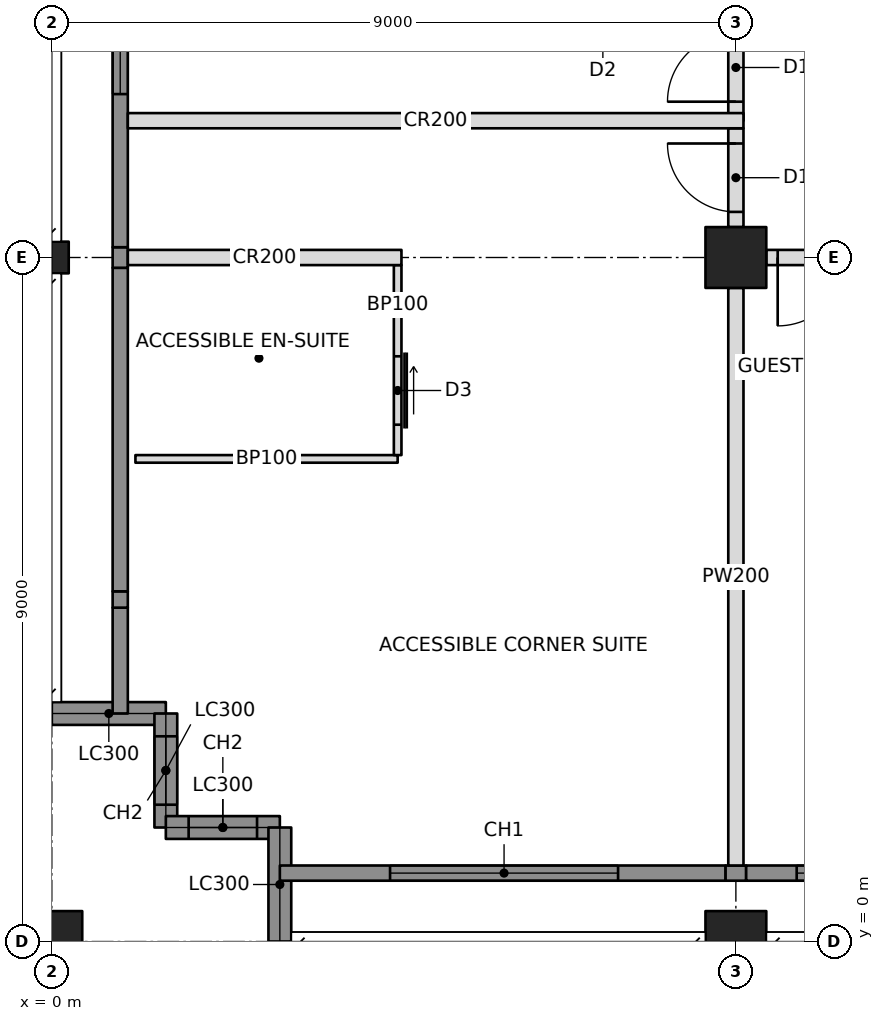
"""IFC4 building model, lengths in metres.
Left out: names, types, materials, properties, quantities, classifications, styles, units other than length and angle.
Written with IfcOpenShell. Run it as: python <this file> out.ifc"""

import sys

from ifc_helpers import new_model, si_unit, direction, frame, frame_2d, origin, origin_with_axes, origin_2d, place, context, subcontext, project, spatial, rectangle, hollow_rectangle, i_section, extrude, element, fill, save


model = new_model("IFC4")
c1 = context("Model", 3, precision=1e-05, world=origin(), true_north=direction((0.0, 1.0)))
c2 = subcontext(c1, "Body", "Model", "MODEL_VIEW")
j1 = project(units=[si_unit("LENGTHUNIT", "METRE"), si_unit("PLANEANGLEUNIT", "RADIAN")], contexts=[c1])
p1 = place(None, origin())
s1 = spatial("IfcSite", under=j1, at=p1, CompositionType="ELEMENT")
p2 = place(p1, origin())
s2 = spatial("IfcBuilding", under=s1, at=p2, CompositionType="ELEMENT")
p3 = place(p2, frame((0.0, 0.0, 248.2)))
s3 = spatial("IfcBuildingStorey", under=s2, at=p3, CompositionType="ELEMENT", Elevation=248.2)
p4 = place(p3, origin_with_axes())
e1 = element("IfcColumn", 1, at=p4, inside=s3, PredefinedType="COLUMN", context=c2, shape_type="SweptSolid", body=[
    extrude(hollow_rectangle(XDim=0.8, YDim=0.8, WallThickness=0.032, at=origin_2d()), origin(), (0.0, 0.0, 1.0), 3.6),
])
p5 = place(p3, frame((0.0, 9.0, 0.0), z_axis=(0.0, 0.0, 1.0), x_axis=(0.0, 1.0, 0.0)))
e2 = element("IfcColumn", 2, at=p5, inside=s3, PredefinedType="COLUMN", context=c2, shape_type="SweptSolid", body=[
    extrude(i_section(OverallWidth=0.417, OverallDepth=0.445, WebThickness=0.039, FlangeThickness=0.063, at=origin_2d()), origin(), (0.0, 0.0, 1.0), 3.6),
])
for number, where, z_axis, x_axis in (
    (3, (9.0, 0.0, 0.0), (0.0, 0.0, 1.0), (1.0, 0.0, 0.0)),
    (4, (9.0, 9.0, 0.0), (0.0, 0.0, 1.0), (1.0, 0.0, 0.0)),
):
    element("IfcColumn", number, at=place(p3, frame(where, z_axis=z_axis, x_axis=x_axis)), inside=s3, PredefinedType="COLUMN", context=c2, shape_type="SweptSolid", body=[
        extrude(hollow_rectangle(XDim=0.8, YDim=0.8, WallThickness=0.032, at=origin_2d()), origin(), (0.0, 0.0, 1.0), 3.6),
    ])
p6 = place(p3, frame((0.0, 3.0, 0.0), z_axis=(0.0, 0.0, 1.0), x_axis=(1.0, 0.0, 0.0)))
e5 = element("IfcWall", 5, at=p6, inside=s3, PredefinedType="SOLIDWALL", context=c2, shape_type="SweptSolid", body=[
    extrude(rectangle(XDim=1.5, YDim=0.3, at=frame_2d((0.75, 0.0))), origin(), (0.0, 0.0, 1.0), 2.62),
])
p7 = place(p3, frame((1.5, 3.0, 0.0), z_axis=(0.0, 0.0, 1.0), x_axis=(0.0, -1.0, 0.0)))
e6 = element("IfcWall", 6, at=p7, inside=s3, PredefinedType="SOLIDWALL", context=c2, shape_type="SweptSolid", body=[
    extrude(rectangle(XDim=1.5, YDim=0.3, at=frame_2d((0.75, 0.0))), origin(), (0.0, 0.0, 1.0), 3.4),
])
p8 = place(p7, frame((0.3, 0.0, 0.6)))
e7 = element("IfcOpeningElement", 7, at=p8, cuts=e6, PredefinedType="OPENING", context=c2, shape_type="SweptSolid", body=[
    extrude(rectangle(XDim=0.9, YDim=2.2, at=frame_2d((0.45, 1.1))), frame((0.0, 0.16, 0.0), z_axis=(0.0, -1.0, 0.0), x_axis=(1.0, 0.0, 0.0)), (0.0, 0.0, 1.0), 0.32),
])
p9 = place(p3, frame((1.5, 1.5, 0.0), z_axis=(0.0, 0.0, 1.0), x_axis=(1.0, 0.0, 0.0)))
e8 = element("IfcWall", 8, at=p9, inside=s3, PredefinedType="SOLIDWALL", context=c2, shape_type="SweptSolid", body=[
    extrude(rectangle(XDim=1.5, YDim=0.3, at=frame_2d((0.75, 0.0))), origin(), (0.0, 0.0, 1.0), 3.4),
])
p10 = place(p9, frame((0.3, 0.0, 0.6)))
e9 = element("IfcOpeningElement", 9, at=p10, cuts=e8, PredefinedType="OPENING", context=c2, shape_type="SweptSolid", body=[
    extrude(rectangle(XDim=0.9, YDim=2.2, at=frame_2d((0.45, 1.1))), frame((0.0, 0.16, 0.0), z_axis=(0.0, -1.0, 0.0), x_axis=(1.0, 0.0, 0.0)), (0.0, 0.0, 1.0), 0.32),
])
p11 = place(p3, frame((3.0, 1.5, 0.0), z_axis=(0.0, 0.0, 1.0), x_axis=(0.0, -1.0, 0.0)))
e10 = element("IfcWall", 10, at=p11, inside=s3, PredefinedType="SOLIDWALL", context=c2, shape_type="SweptSolid", body=[
    extrude(rectangle(XDim=1.5, YDim=0.3, at=frame_2d((0.75, 0.0))), origin(), (0.0, 0.0, 1.0), 2.62),
])
p12 = place(p3, frame((3.0, 0.9, 0.0), z_axis=(0.0, 0.0, 1.0), x_axis=(1.0, 0.0, 0.0)))
e11 = element("IfcWall", 11, at=p12, inside=s3, PredefinedType="SOLIDWALL", context=c2, shape_type="SweptSolid", body=[
    extrude(rectangle(XDim=5.865, YDim=0.2, at=frame_2d((2.932, 0.0))), origin(), (0.0, 0.0, 1.0), 3.4),
])
p13 = place(p12, frame((1.45, 0.0, 0.6)))
e12 = element("IfcOpeningElement", 12, at=p13, cuts=e11, PredefinedType="OPENING", context=c2, shape_type="SweptSolid", body=[
    extrude(rectangle(XDim=3.0, YDim=2.2, at=frame_2d((1.5, 1.1))), frame((0.0, 0.11, 0.0), z_axis=(0.0, -1.0, 0.0), x_axis=(1.0, 0.0, 0.0)), (0.0, 0.0, 1.0), 0.22),
])
p14 = place(p3, frame((0.9, 3.0, 0.0), z_axis=(0.0, 0.0, 1.0), x_axis=(0.0, 1.0, 0.0)))
e13 = element("IfcWall", 13, at=p14, inside=s3, PredefinedType="SOLIDWALL", context=c2, shape_type="SweptSolid", body=[
    extrude(rectangle(XDim=1.393, YDim=0.2, at=frame_2d((0.696, 0.0))), origin(), (0.0, 0.0, 1.0), 3.4),
])
p15 = place(p3, frame((1.0, 9.0, 0.0), z_axis=(0.0, 0.0, 1.0), x_axis=(1.0, 0.0, 0.0)))
e14 = element("IfcWall", 14, at=p15, inside=s3, PredefinedType="PARTITIONING", context=c2, shape_type="SweptSolid", body=[
    extrude(rectangle(XDim=3.6, YDim=0.2, at=frame_2d((1.8, 0.0))), origin(), (0.0, 0.0, 1.0), 2.638),
])
p16 = place(p3, frame((9.4, 9.0, 0.0), z_axis=(0.0, 0.0, 1.0), x_axis=(1.0, 0.0, 0.0)))
e15 = element("IfcWall", 15, at=p16, inside=s3, PredefinedType="PARTITIONING", context=c2, shape_type="SweptSolid", body=[
    extrude(rectangle(XDim=8.2, YDim=0.2, at=frame_2d((4.1, 0.0))), origin(), (0.0, 0.0, 1.0), 2.605),
])
p17 = place(p16, frame((0.15, 0.0, 0.0)))
e16 = element("IfcOpeningElement", 16, at=p17, cuts=e15, PredefinedType="OPENING", context=c2, shape_type="SweptSolid", body=[
    extrude(rectangle(XDim=0.9, YDim=2.1, at=frame_2d((0.45, 1.05))), frame((0.0, 0.11, 0.0), z_axis=(0.0, -1.0, 0.0), x_axis=(1.0, 0.0, 0.0)), (0.0, 0.0, 1.0), 0.22),
])
p18 = place(p3, frame((9.0, 10.8, 0.0), z_axis=(0.0, 0.0, 1.0), x_axis=(0.0, 1.0, 0.0)))
e17 = element("IfcWall", 17, at=p18, inside=s3, PredefinedType="PARTITIONING", context=c2, shape_type="SweptSolid", body=[
    extrude(rectangle(XDim=6.8, YDim=0.2, at=frame_2d((3.4, 0.0))), origin(), (0.0, 0.0, 1.0), 2.605),
])
p19 = place(p18, frame((0.25, 0.0, 0.0)))
e18 = element("IfcOpeningElement", 18, at=p19, cuts=e17, PredefinedType="OPENING", context=c2, shape_type="SweptSolid", body=[
    extrude(rectangle(XDim=0.9, YDim=2.1, at=frame_2d((0.45, 1.05))), frame((0.0, 0.11, 0.0), z_axis=(0.0, -1.0, 0.0), x_axis=(1.0, 0.0, 0.0)), (0.0, 0.0, 1.0), 0.22),
])
p20 = place(p18, frame((3.85, 0.0, 0.0)))
e19 = element("IfcOpeningElement", 19, at=p20, cuts=e17, PredefinedType="OPENING", context=c2, shape_type="SweptSolid", body=[
    extrude(rectangle(XDim=0.9, YDim=2.1, at=frame_2d((0.45, 1.05))), frame((0.0, 0.11, 0.0), z_axis=(0.0, -1.0, 0.0), x_axis=(1.0, 0.0, 0.0)), (0.0, 0.0, 1.0), 0.22),
])
p21 = place(p3, frame((1.0, 10.8, 0.0), z_axis=(0.0, 0.0, 1.0), x_axis=(1.0, 0.0, 0.0)))
e20 = element("IfcWall", 20, at=p21, inside=s3, PredefinedType="PARTITIONING", context=c2, shape_type="SweptSolid", body=[
    extrude(rectangle(XDim=8.1, YDim=0.2, at=frame_2d((4.05, 0.0))), origin(), (0.0, 0.0, 1.0), 2.604),
])
p22 = place(p3, frame((9.0, 8.6, 0.0), z_axis=(0.0, 0.0, 1.0), x_axis=(0.0, -1.0, 0.0)))
e21 = element("IfcWall", 21, at=p22, inside=s3, PredefinedType="PARTITIONING", context=c2, shape_type="SweptSolid", body=[
    extrude(rectangle(XDim=7.6, YDim=0.2, at=frame_2d((3.8, 0.0))), origin(), (0.0, 0.0, 1.0), 2.638),
])
p23 = place(p3, frame((1.1, 6.35, 0.0), z_axis=(0.0, 0.0, 1.0), x_axis=(1.0, 0.0, 0.0)))
e22 = element("IfcWall", 22, at=p23, inside=s3, PredefinedType="PARTITIONING", context=c2, shape_type="SweptSolid", body=[
    extrude(rectangle(XDim=3.45, YDim=0.1, at=frame_2d((1.725, 0.0))), origin(), (0.0, 0.0, 1.0), 3.4),
])
p24 = place(p3, frame((4.55, 8.9, 0.0), z_axis=(0.0, 0.0, 1.0), x_axis=(0.0, -1.0, 0.0)))
e23 = element("IfcWall", 23, at=p24, inside=s3, PredefinedType="PARTITIONING", context=c2, shape_type="SweptSolid", body=[
    extrude(rectangle(XDim=2.5, YDim=0.1, at=frame_2d((1.25, 0.0))), origin(), (0.0, 0.0, 1.0), 2.638),
])
p25 = place(p24, frame((1.2, 0.0, 0.0)))
e24 = element("IfcOpeningElement", 24, at=p25, cuts=e23, PredefinedType="OPENING", context=c2, shape_type="SweptSolid", body=[
    extrude(rectangle(XDim=0.9, YDim=2.1, at=frame_2d((0.45, 1.05))), frame((0.0, 0.06, 0.0), z_axis=(0.0, -1.0, 0.0), x_axis=(1.0, 0.0, 0.0)), (0.0, 0.0, 1.0), 0.12),
])
p26 = place(p3, frame((9.0, 9.4, 0.0), z_axis=(0.0, 0.0, 1.0), x_axis=(0.0, 1.0, 0.0)))
e25 = element("IfcWall", 25, at=p26, inside=s3, PredefinedType="PARTITIONING", context=c2, shape_type="SweptSolid", body=[
    extrude(rectangle(XDim=1.3, YDim=0.2, at=frame_2d((0.65, 0.0))), origin(), (0.0, 0.0, 1.0), 2.605),
])
p27 = place(p26, frame((0.2, 0.0, 0.0)))
e26 = element("IfcOpeningElement", 26, at=p27, cuts=e25, PredefinedType="OPENING", context=c2, shape_type="SweptSolid", body=[
    extrude(rectangle(XDim=0.9, YDim=2.1, at=frame_2d((0.45, 1.05))), frame((0.0, 0.11, 0.0), z_axis=(0.0, -1.0, 0.0), x_axis=(1.0, 0.0, 0.0)), (0.0, 0.0, 1.0), 0.22),
])
p28 = place(p3, frame((8.865, 0.9, 0.0), z_axis=(0.0, 0.0, 1.0), x_axis=(1.0, 0.0, 0.0)))
e27 = element("IfcWall", 27, at=p28, inside=s3, PredefinedType="SOLIDWALL", context=c2, shape_type="SweptSolid", body=[
    extrude(rectangle(XDim=0.271, YDim=0.2, at=frame_2d((0.135, 0.0))), origin(), (0.0, 0.0, 1.0), 2.638),
])
p29 = place(p3, frame((9.135, 0.9, 0.0), z_axis=(0.0, 0.0, 1.0), x_axis=(1.0, 0.0, 0.0)))
e28 = element("IfcWall", 28, at=p29, inside=s3, PredefinedType="SOLIDWALL", context=c2, shape_type="SweptSolid", body=[
    extrude(rectangle(XDim=8.671, YDim=0.2, at=frame_2d((4.335, 0.0))), origin(), (0.0, 0.0, 1.0), 3.4),
])
p30 = place(p29, frame((0.665, 0.0, 0.6)))
e29 = element("IfcOpeningElement", 29, at=p30, cuts=e28, PredefinedType="OPENING", context=c2, shape_type="SweptSolid", body=[
    extrude(rectangle(XDim=3.0, YDim=2.2, at=frame_2d((1.5, 1.1))), frame((0.0, 0.11, 0.0), z_axis=(0.0, -1.0, 0.0), x_axis=(1.0, 0.0, 0.0)), (0.0, 0.0, 1.0), 0.22),
])
p31 = place(p29, frame((5.065, 0.0, 0.6)))
e30 = element("IfcOpeningElement", 30, at=p31, cuts=e28, PredefinedType="OPENING", context=c2, shape_type="SweptSolid", body=[
    extrude(rectangle(XDim=3.0, YDim=2.2, at=frame_2d((1.5, 1.1))), frame((0.0, 0.11, 0.0), z_axis=(0.0, -1.0, 0.0), x_axis=(1.0, 0.0, 0.0)), (0.0, 0.0, 1.0), 0.22),
])
p32 = place(p3, frame((0.9, 4.393, 0.0), z_axis=(0.0, 0.0, 1.0), x_axis=(0.0, 1.0, 0.0)))
e31 = element("IfcWall", 31, at=p32, inside=s3, PredefinedType="SOLIDWALL", context=c2, shape_type="SweptSolid", body=[
    extrude(rectangle(XDim=0.215, YDim=0.2, at=frame_2d((0.107, 0.0))), origin(), (0.0, 0.0, 1.0), 2.861),
])
p33 = place(p3, frame((0.9, 4.607, 0.0), z_axis=(0.0, 0.0, 1.0), x_axis=(0.0, 1.0, 0.0)))
e32 = element("IfcWall", 32, at=p33, inside=s3, PredefinedType="SOLIDWALL", context=c2, shape_type="SweptSolid", body=[
    extrude(rectangle(XDim=4.257, YDim=0.2, at=frame_2d((2.129, 0.0))), origin(), (0.0, 0.0, 1.0), 3.4),
])
p34 = place(p3, frame((0.9, 8.865, 0.0), z_axis=(0.0, 0.0, 1.0), x_axis=(0.0, 1.0, 0.0)))
e33 = element("IfcWall", 33, at=p34, inside=s3, PredefinedType="SOLIDWALL", context=c2, shape_type="SweptSolid", body=[
    extrude(rectangle(XDim=0.271, YDim=0.2, at=frame_2d((0.135, 0.0))), origin(), (0.0, 0.0, 1.0), 2.638),
])
p35 = place(p3, frame((0.9, 9.135, 0.0), z_axis=(0.0, 0.0, 1.0), x_axis=(0.0, 1.0, 0.0)))
e34 = element("IfcWall", 34, at=p35, inside=s3, PredefinedType="SOLIDWALL", context=c2, shape_type="SweptSolid", body=[
    extrude(rectangle(XDim=8.671, YDim=0.2, at=frame_2d((4.335, 0.0))), origin(), (0.0, 0.0, 1.0), 3.4),
])
p36 = place(p35, frame((2.015, 0.0, 0.6)))
e35 = element("IfcOpeningElement", 35, at=p36, cuts=e34, PredefinedType="OPENING", context=c2, shape_type="SweptSolid", body=[
    extrude(rectangle(XDim=3.0, YDim=2.2, at=frame_2d((1.5, 1.1))), frame((0.0, 0.11, 0.0), z_axis=(0.0, -1.0, 0.0), x_axis=(1.0, 0.0, 0.0)), (0.0, 0.0, 1.0), 0.22),
])
p37 = place(p35, frame((5.515, 0.0, 0.6)))
e36 = element("IfcOpeningElement", 36, at=p37, cuts=e34, PredefinedType="OPENING", context=c2, shape_type="SweptSolid", body=[
    extrude(rectangle(XDim=3.0, YDim=2.2, at=frame_2d((1.5, 1.1))), frame((0.0, 0.11, 0.0), z_axis=(0.0, -1.0, 0.0), x_axis=(1.0, 0.0, 0.0)), (0.0, 0.0, 1.0), 0.22),
])
p38 = place(p8, origin())
e37 = element("IfcWindow", 37, at=p38, inside=s3, PartitioningType="SINGLE_PANEL", PredefinedType="WINDOW", context=c2, shape_type="SweptSolid", body=[
    extrude(rectangle(XDim=0.9, YDim=2.2, at=frame_2d((0.45, 1.1))), frame((0.0, 0.03, 0.0), z_axis=(0.0, -1.0, 0.0), x_axis=(1.0, 0.0, 0.0)), (0.0, 0.0, 1.0), 0.06),
])
fill(e7, e37)
p39 = place(p10, origin())
e38 = element("IfcWindow", 38, at=p39, inside=s3, PartitioningType="SINGLE_PANEL", PredefinedType="WINDOW", context=c2, shape_type="SweptSolid", body=[
    extrude(rectangle(XDim=0.9, YDim=2.2, at=frame_2d((0.45, 1.1))), frame((0.0, 0.03, 0.0), z_axis=(0.0, -1.0, 0.0), x_axis=(1.0, 0.0, 0.0)), (0.0, 0.0, 1.0), 0.06),
])
fill(e9, e38)
p40 = place(p13, origin())
e39 = element("IfcWindow", 39, at=p40, inside=s3, PartitioningType="TRIPLE_PANEL_VERTICAL", PredefinedType="WINDOW", context=c2, shape_type="SweptSolid", body=[
    extrude(rectangle(XDim=3.0, YDim=2.2, at=frame_2d((1.5, 1.1))), frame((0.0, 0.03, 0.0), z_axis=(0.0, -1.0, 0.0), x_axis=(1.0, 0.0, 0.0)), (0.0, 0.0, 1.0), 0.06),
])
fill(e12, e39)
p41 = place(p30, origin())
e40 = element("IfcWindow", 40, at=p41, inside=s3, PartitioningType="TRIPLE_PANEL_VERTICAL", PredefinedType="WINDOW", context=c2, shape_type="SweptSolid", body=[
    extrude(rectangle(XDim=3.0, YDim=2.2, at=frame_2d((1.5, 1.1))), frame((0.0, 0.03, 0.0), z_axis=(0.0, -1.0, 0.0), x_axis=(1.0, 0.0, 0.0)), (0.0, 0.0, 1.0), 0.06),
])
fill(e29, e40)
p42 = place(p36, origin())
e41 = element("IfcWindow", 41, at=p42, inside=s3, PartitioningType="TRIPLE_PANEL_VERTICAL", PredefinedType="WINDOW", context=c2, shape_type="SweptSolid", body=[
    extrude(rectangle(XDim=3.0, YDim=2.2, at=frame_2d((1.5, 1.1))), frame((0.0, 0.03, 0.0), z_axis=(0.0, -1.0, 0.0), x_axis=(1.0, 0.0, 0.0)), (0.0, 0.0, 1.0), 0.06),
])
fill(e35, e41)
p43 = place(p25, origin())
e42 = element("IfcDoor", 42, at=p43, inside=s3, OperationType="SLIDING_TO_LEFT", PredefinedType="DOOR", context=c2, shape_type="SweptSolid", body=[
    extrude(rectangle(XDim=0.9, YDim=2.1, at=frame_2d((0.45, 1.05))), frame((0.0, 0.025, 0.0), z_axis=(0.0, -1.0, 0.0), x_axis=(1.0, 0.0, 0.0)), (0.0, 0.0, 1.0), 0.05),
])
fill(e24, e42)
p44 = place(p17, frame((0.9, 0.0, 0.0), z_axis=(0.0, 0.0, 1.0), x_axis=(-1.0, 0.0, 0.0)))
e43 = element("IfcDoor", 43, at=p44, inside=s3, OperationType="SINGLE_SWING_RIGHT", PredefinedType="DOOR", context=c2, shape_type="SweptSolid", body=[
    extrude(rectangle(XDim=0.9, YDim=2.1, at=frame_2d((0.45, 1.05))), frame((0.0, 0.025, 0.0), z_axis=(0.0, -1.0, 0.0), x_axis=(1.0, 0.0, 0.0)), (0.0, 0.0, 1.0), 0.05),
])
fill(e16, e43)
p45 = place(p19, origin())
e44 = element("IfcDoor", 44, at=p45, inside=s3, OperationType="SINGLE_SWING_LEFT", PredefinedType="DOOR", context=c2, shape_type="SweptSolid", body=[
    extrude(rectangle(XDim=0.9, YDim=2.1, at=frame_2d((0.45, 1.05))), frame((0.0, 0.025, 0.0), z_axis=(0.0, -1.0, 0.0), x_axis=(1.0, 0.0, 0.0)), (0.0, 0.0, 1.0), 0.05),
])
fill(e18, e44)
p46 = place(p27, origin())
e45 = element("IfcDoor", 45, at=p46, inside=s3, OperationType="SINGLE_SWING_RIGHT", PredefinedType="DOOR", context=c2, shape_type="SweptSolid", body=[
    extrude(rectangle(XDim=0.9, YDim=2.1, at=frame_2d((0.45, 1.05))), frame((0.0, 0.025, 0.0), z_axis=(0.0, -1.0, 0.0), x_axis=(1.0, 0.0, 0.0)), (0.0, 0.0, 1.0), 0.05),
])
fill(e26, e45)
save(model, sys.argv[1])
